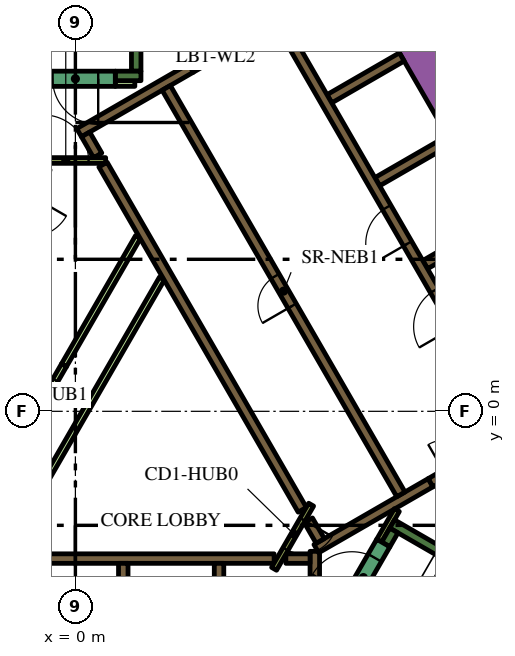
"""IFC4 building model, lengths in metres.
Left out: names, types, materials, properties, quantities, classifications, styles, units other than length and angle.
Written with IfcOpenShell. Run it as: python <this file> out.ifc"""

import sys

from ifc_helpers import new_model, si_unit, direction, frame, frame_2d, origin, place, context, subcontext, project, spatial, rectangle, extrude, element, fill, save


model = new_model("IFC4")
c1 = context("Model", 3, precision=1e-05, world=origin(), true_north=direction((0.0, 1.0)))
c2 = subcontext(c1, "Body", "Model", "MODEL_VIEW")
j1 = project(units=[si_unit("LENGTHUNIT", "METRE"), si_unit("PLANEANGLEUNIT", "RADIAN")], contexts=[c1])
p1 = place(None, origin())
s1 = spatial("IfcSite", under=j1, at=p1, CompositionType="ELEMENT")
p2 = place(p1, origin())
s2 = spatial("IfcBuilding", under=s1, at=p2, CompositionType="ELEMENT")
p3 = place(p2, frame((0.0, 0.0, 70.5)))
s3 = spatial("IfcBuildingStorey", under=s2, at=p3, CompositionType="ELEMENT", Elevation=70.5)
p4 = place(p3, frame((6.461, 13.909, 0.0), z_axis=(0.0, 0.0, 1.0), x_axis=(0.500005804227, -0.866022052686, 0.0)))
e1 = element("IfcWall", 1, at=p4, inside=s3, PredefinedType="SOLIDWALL", context=c2, shape_type="SweptSolid", body=[
    extrude(rectangle(XDim=20.834, YDim=0.9, at=frame_2d((10.417, 0.0))), origin(), (0.0, 0.0, 1.0), 3.9),
])
p5 = place(p3, frame((8.334, -2.964, 0.0), z_axis=(0.0, 0.0, 1.0), x_axis=(0.866016039709, -0.500016218704, 0.0)))
e2 = element("IfcWall", 2, at=p5, inside=s3, PredefinedType="SOLIDWALL", context=c2, shape_type="SweptSolid", body=[
    extrude(rectangle(XDim=7.05, YDim=0.25, at=frame_2d((3.525, 0.0))), origin(), (0.0, 0.0, 1.0), 3.9),
])
p6 = place(p3, frame((8.168, -3.503, 0.0), z_axis=(0.0, 0.0, 1.0), x_axis=(0.49972245349, 0.866185586049, 0.0)))
e3 = element("IfcWall", 3, at=p6, inside=s3, PredefinedType="SOLIDWALL", context=c2, shape_type="SweptSolid", body=[
    extrude(rectangle(XDim=0.425, YDim=0.25, at=frame_2d((0.212, 0.0))), origin(), (0.0, 0.0, 1.0), 3.9),
])
p7 = place(p3, frame((1.6, 8.95, 0.0), z_axis=(0.0, 0.0, 1.0), x_axis=(0.0, 1.0, 0.0)))
e4 = element("IfcWall", 4, at=p7, inside=s3, PredefinedType="SOLIDWALL", context=c2, shape_type="SweptSolid", body=[
    extrude(rectangle(XDim=6.8, YDim=0.25, at=frame_2d((3.4, 0.0))), origin(), (0.0, 0.0, 1.0), 3.9),
])
p8 = place(p3, frame((1.05, 8.825, 0.0), z_axis=(0.0, 0.0, 1.0), x_axis=(1.0, 0.0, 0.0)))
e5 = element("IfcWall", 5, at=p8, inside=s3, PredefinedType="SOLIDWALL", context=c2, shape_type="SweptSolid", body=[
    extrude(rectangle(XDim=0.675, YDim=0.25, at=frame_2d((0.337, 0.0))), origin(), (0.0, 0.0, 1.0), 3.9),
])
p9 = place(p3, frame((-5.259, -3.875, 0.0), z_axis=(0.0, 0.0, 1.0), x_axis=(1.0, 0.0, 0.0)))
e6 = element("IfcWall", 6, at=p9, inside=s3, PredefinedType="SOLIDWALL", context=c2, shape_type="SweptSolid", body=[
    extrude(rectangle(XDim=10.489, YDim=0.25, at=frame_2d((5.244, 0.0))), origin(), (0.0, 0.0, 1.0), 3.9),
])
for number, where, z_axis, x_axis in (
    (7, (3.78, -4.0, 0.0), (0.0, 0.0, 1.0), (0.0, -1.0, 0.0)),
    (8, (1.26, -4.0, 0.0), (0.0, 0.0, 1.0), (0.0, -1.0, 0.0)),
):
    element("IfcWall", number, at=place(p3, frame(where, z_axis=z_axis, x_axis=x_axis)), inside=s3, PredefinedType="SOLIDWALL", context=c2, shape_type="SweptSolid", body=[
        extrude(rectangle(XDim=2.2, YDim=0.25, at=frame_2d((1.1, 0.0))), origin(), (0.0, 0.0, 1.0), 3.9),
    ])
p10 = place(p3, frame((6.3, -7.27, 0.0), z_axis=(0.0, 0.0, 1.0), x_axis=(0.0, 1.0, 0.0)))
e9 = element("IfcWall", 9, at=p10, inside=s3, PredefinedType="SOLIDWALL", context=c2, shape_type="SweptSolid", body=[
    extrude(rectangle(XDim=3.586, YDim=0.25, at=frame_2d((1.793, 0.0))), origin(), (0.0, 0.0, 1.0), 3.9),
])
p11 = place(p3, frame((5.538, -3.875, 0.0), z_axis=(0.0, 0.0, 1.0), x_axis=(1.0, 0.0, 0.0)))
e10 = element("IfcWall", 10, at=p11, inside=s3, PredefinedType="SOLIDWALL", context=c2, shape_type="SweptSolid", body=[
    extrude(rectangle(XDim=0.637, YDim=0.25, at=frame_2d((0.318, 0.0))), origin(), (0.0, 0.0, 1.0), 3.9),
])
p12 = place(p3, frame((9.346, -1.879, 0.0), z_axis=(0.0, 0.0, 1.0), x_axis=(-0.866048528039, -0.499959945477, 0.0)))
e11 = element("IfcWall", 11, at=p12, inside=s3, PredefinedType="SOLIDWALL", context=c2, shape_type="SweptSolid", body=[
    extrude(rectangle(XDim=3.47, YDim=0.25, at=frame_2d((1.735, 0.0))), origin(), (0.0, 0.0, 1.0), 3.9),
])
p13 = place(p3, frame((6.13, -2.867, 0.0), z_axis=(0.0, 0.0, 1.0), x_axis=(0.500160776593, -0.865932559475, 0.0)))
e12 = element("IfcWall", 12, at=p13, inside=s3, PredefinedType="SOLIDWALL", context=c2, shape_type="SweptSolid", body=[
    extrude(rectangle(XDim=0.627, YDim=0.25, at=frame_2d((0.313, 0.0))), origin(), (0.0, 0.0, 1.0), 3.9),
])
for number, where, z_axis, x_axis in (
    (13, (9.204, 3.859, 0.0), (0.0, 0.0, 1.0), (0.866, 0.5, 0.0)),
    (14, (7.944, 6.041, 0.0), (0.0, 0.0, 1.0), (0.866, 0.5, 0.0)),
    (15, (6.684, 8.224, 0.0), (0.0, 0.0, 1.0), (0.866, 0.5, 0.0)),
):
    element("IfcWall", number, at=place(p3, frame(where, z_axis=z_axis, x_axis=x_axis)), inside=s3, PredefinedType="SOLIDWALL", context=c2, shape_type="SweptSolid", body=[
        extrude(rectangle(XDim=2.2, YDim=0.25, at=frame_2d((1.1, 0.0))), origin(), (0.0, 0.0, 1.0), 3.9),
    ])
p14 = place(p3, frame((0.098, 7.331, 0.0), z_axis=(0.0, 0.0, 1.0), x_axis=(0.865988154826, 0.50006451154, 0.0)))
e16 = element("IfcWall", 16, at=p14, inside=s3, PredefinedType="SOLIDWALL", context=c2, shape_type="SweptSolid", body=[
    extrude(rectangle(XDim=3.398, YDim=0.25, at=frame_2d((1.699, 0.0))), origin(), (0.0, 0.0, 1.0), 3.9),
])
p15 = place(p3, frame((0.268, 7.285, 0.0), z_axis=(0.0, 0.0, 1.0), x_axis=(0.500098681536, -0.865968422476, 0.0)))
e17 = element("IfcWall", 17, at=p15, inside=s3, PredefinedType="SOLIDWALL", context=c2, shape_type="SweptSolid", body=[
    extrude(rectangle(XDim=0.636, YDim=0.25, at=frame_2d((0.318, 0.0))), origin(), (0.0, 0.0, 1.0), 3.9),
])
p16 = place(p3, frame((5.97, -2.591, 0.0), z_axis=(0.0, 0.0, 1.0), x_axis=(-0.499994469932, 0.866028596547, 0.0)))
e18 = element("IfcWall", 18, at=p16, inside=s3, PredefinedType="SOLIDWALL", context=c2, shape_type="SweptSolid", body=[
    extrude(rectangle(XDim=10.488, YDim=0.25, at=frame_2d((5.244, 0.0))), origin(), (0.0, 0.0, 1.0), 3.9),
])
p17 = place(p3, frame((8.459, -2.599, 0.0), z_axis=(0.0, 0.0, 1.0), x_axis=(-0.500041054325, -0.866001699761, 0.0)))
e19 = element("IfcWall", 19, at=p17, inside=s3, PredefinedType="PARTITIONING", context=c2, shape_type="SweptSolid", body=[
    extrude(rectangle(XDim=0.929, YDim=0.15, at=frame_2d((0.464, 0.0))), origin(), (0.0, 0.0, 1.0), 3.9),
])
p18 = place(p3, frame((-1.887, -3.718, 0.0), z_axis=(0.0, 0.0, 1.0), x_axis=(0.500005008002, 0.866022512394, 0.0)))
e20 = element("IfcWall", 20, at=p18, inside=s3, PredefinedType="PARTITIONING", context=c2, shape_type="SweptSolid", body=[
    extrude(rectangle(XDim=8.327, YDim=0.15, at=frame_2d((4.164, 0.0))), origin(), (0.0, 0.0, 1.0), 2.75),
])
p19 = place(p3, frame((-0.3, 1.212, 0.0), z_axis=(0.0, 0.0, 1.0), x_axis=(0.499963101113, 0.866046706318, 0.0)))
e21 = element("IfcWall", 21, at=p19, inside=s3, PredefinedType="PARTITIONING", context=c2, shape_type="SweptSolid", body=[
    extrude(rectangle(XDim=3.893, YDim=0.15, at=frame_2d((1.947, 0.0))), origin(), (0.0, 0.0, 1.0), 2.75),
])
p20 = place(p3, frame((1.05, 8.625, 0.0), z_axis=(0.0, 0.0, 1.0), x_axis=(1.0, 0.0, 0.0)))
e22 = element("IfcWall", 22, at=p20, inside=s3, PredefinedType="PARTITIONING", context=c2, shape_type="SweptSolid", body=[
    extrude(rectangle(XDim=0.514, YDim=0.15, at=frame_2d((0.257, 0.0))), origin(), (0.0, 0.0, 1.0), 2.75),
])
p21 = place(p3, frame((11.553, -0.46, 0.0), z_axis=(0.0, 0.0, 1.0), x_axis=(-0.500006514828, 0.866021642414, 0.0)))
e23 = element("IfcWall", 23, at=p21, inside=s3, PredefinedType="SOLIDWALL", context=c2, shape_type="SweptSolid", body=[
    extrude(rectangle(XDim=12.35, YDim=0.25, at=frame_2d((6.175, 0.0))), origin(), (0.0, 0.0, 1.0), 3.9),
])
p22 = place(p21, frame((0.585, 0.0, 0.0)))
e24 = element("IfcOpeningElement", 24, at=p22, cuts=e23, PredefinedType="OPENING", context=c2, shape_type="SweptSolid", body=[
    extrude(rectangle(XDim=1.1, YDim=2.1, at=frame_2d((0.55, 1.05))), frame((0.0, 0.135, 0.0), z_axis=(0.0, -1.0, 0.0), x_axis=(1.0, 0.0, 0.0)), (0.0, 0.0, 1.0), 0.27),
])
p23 = place(p21, frame((3.105, 0.0, 0.0)))
e25 = element("IfcOpeningElement", 25, at=p23, cuts=e23, PredefinedType="OPENING", context=c2, shape_type="SweptSolid", body=[
    extrude(rectangle(XDim=1.1, YDim=2.1, at=frame_2d((0.55, 1.05))), frame((0.0, 0.135, 0.0), z_axis=(0.0, -1.0, 0.0), x_axis=(1.0, 0.0, 0.0)), (0.0, 0.0, 1.0), 0.27),
])
p24 = place(p21, frame((5.625, 0.0, 0.0)))
e26 = element("IfcOpeningElement", 26, at=p24, cuts=e23, PredefinedType="OPENING", context=c2, shape_type="SweptSolid", body=[
    extrude(rectangle(XDim=1.1, YDim=2.1, at=frame_2d((0.55, 1.05))), frame((0.0, 0.135, 0.0), z_axis=(0.0, -1.0, 0.0), x_axis=(1.0, 0.0, 0.0)), (0.0, 0.0, 1.0), 0.27),
])
p25 = place(p3, frame((8.565, -2.185, 0.0), z_axis=(0.0, 0.0, 1.0), x_axis=(-0.499997954832, 0.866026584559, 0.0)))
e27 = element("IfcWall", 27, at=p25, inside=s3, PredefinedType="SOLIDWALL", context=c2, shape_type="SweptSolid", body=[
    extrude(rectangle(XDim=12.35, YDim=0.25, at=frame_2d((6.175, 0.0))), origin(), (0.0, 0.0, 1.0), 3.9),
])
p26 = place(p25, frame((5.725, 0.0, 0.0)))
e28 = element("IfcOpeningElement", 28, at=p26, cuts=e27, PredefinedType="OPENING", context=c2, shape_type="SweptSolid", body=[
    extrude(rectangle(XDim=0.9, YDim=2.1, at=frame_2d((0.45, 1.05))), frame((0.0, 0.135, 0.0), z_axis=(0.0, -1.0, 0.0), x_axis=(1.0, 0.0, 0.0)), (0.0, 0.0, 1.0), 0.27),
])
p27 = place(p3, frame((7.053, -5.284, 0.0), z_axis=(0.0, 0.0, 1.0), x_axis=(0.500078061341, 0.865980330357, 0.0)))
e29 = element("IfcWall", 29, at=p27, inside=s3, PredefinedType="SOLIDWALL", context=c2, shape_type="SweptSolid", body=[
    extrude(rectangle(XDim=2.1, YDim=0.4, at=frame_2d((1.05, 0.0))), origin(), (0.0, 0.0, 1.0), 3.9),
])
p28 = place(p27, frame((0.45, 0.0, 0.0)))
e30 = element("IfcOpeningElement", 30, at=p28, cuts=e29, PredefinedType="OPENING", context=c2, shape_type="SweptSolid", body=[
    extrude(rectangle(XDim=1.2, YDim=2.1, at=frame_2d((0.6, 1.05))), frame((0.0, 0.21, 0.0), z_axis=(0.0, -1.0, 0.0), x_axis=(1.0, 0.0, 0.0)), (0.0, 0.0, 1.0), 0.42),
])
p29 = place(p3, frame((9.346, -1.879, 0.0), z_axis=(0.0, 0.0, 1.0), x_axis=(0.866047807691, 0.499961193289, 0.0)))
e31 = element("IfcWall", 31, at=p29, inside=s3, PredefinedType="SOLIDWALL", context=c2, shape_type="SweptSolid", body=[
    extrude(rectangle(XDim=1.8, YDim=0.25, at=frame_2d((0.9, 0.0))), origin(), (0.0, 0.0, 1.0), 3.9),
])
p30 = place(p29, frame((0.45, 0.0, 0.0)))
e32 = element("IfcOpeningElement", 32, at=p30, cuts=e31, PredefinedType="OPENING", context=c2, shape_type="SweptSolid", body=[
    extrude(rectangle(XDim=0.9, YDim=2.1, at=frame_2d((0.45, 1.05))), frame((0.0, 0.135, 0.0), z_axis=(0.0, -1.0, 0.0), x_axis=(1.0, 0.0, 0.0)), (0.0, 0.0, 1.0), 0.27),
])
p31 = place(p3, frame((1.05, 8.75, 0.0), z_axis=(0.0, 0.0, 1.0), x_axis=(-1.0, 0.0, 0.0)))
e33 = element("IfcWall", 33, at=p31, inside=s3, PredefinedType="SOLIDWALL", context=c2, shape_type="SweptSolid", body=[
    extrude(rectangle(XDim=2.1, YDim=0.4, at=frame_2d((1.05, 0.0))), origin(), (0.0, 0.0, 1.0), 3.9),
])
p32 = place(p31, frame((0.45, 0.0, 0.0)))
e34 = element("IfcOpeningElement", 34, at=p32, cuts=e33, PredefinedType="OPENING", context=c2, shape_type="SweptSolid", body=[
    extrude(rectangle(XDim=1.2, YDim=2.1, at=frame_2d((0.6, 1.05))), frame((0.0, 0.21, 0.0), z_axis=(0.0, -1.0, 0.0), x_axis=(1.0, 0.0, 0.0)), (0.0, 0.0, 1.0), 0.42),
])
p33 = place(p3, frame((6.203, -2.456, 0.0), z_axis=(0.0, 0.0, 1.0), x_axis=(-0.500043961785, -0.866000020948, 0.0)))
e35 = element("IfcWall", 35, at=p33, inside=s3, PredefinedType="PARTITIONING", context=c2, shape_type="SweptSolid", body=[
    extrude(rectangle(XDim=1.95, YDim=0.15, at=frame_2d((0.975, 0.0))), origin(), (0.0, 0.0, 1.0), 3.9),
])
p34 = place(p33, frame((0.45, 0.0, 0.0)))
e36 = element("IfcOpeningElement", 36, at=p34, cuts=e35, PredefinedType="OPENING", context=c2, shape_type="SweptSolid", body=[
    extrude(rectangle(XDim=0.9, YDim=2.1, at=frame_2d((0.45, 1.05))), frame((0.0, 0.085, 0.0), z_axis=(0.0, -1.0, 0.0), x_axis=(1.0, 0.0, 0.0)), (0.0, 0.0, 1.0), 0.17),
])
p35 = place(p3, frame((-1.303, 6.6, 0.0), z_axis=(0.0, 0.0, 1.0), x_axis=(1.0, 0.0, 0.0)))
e37 = element("IfcWall", 37, at=p35, inside=s3, PredefinedType="PARTITIONING", context=c2, shape_type="SweptSolid", body=[
    extrude(rectangle(XDim=2.1, YDim=0.15, at=frame_2d((1.05, 0.0))), origin(), (0.0, 0.0, 1.0), 3.9),
])
p36 = place(p35, frame((0.45, 0.0, 0.0)))
e38 = element("IfcOpeningElement", 38, at=p36, cuts=e37, PredefinedType="OPENING", context=c2, shape_type="SweptSolid", body=[
    extrude(rectangle(XDim=1.2, YDim=2.1, at=frame_2d((0.6, 1.05))), frame((0.0, 0.085, 0.0), z_axis=(0.0, -1.0, 0.0), x_axis=(1.0, 0.0, 0.0)), (0.0, 0.0, 1.0), 0.17),
])
p37 = place(p3, frame((3.081, 8.961, 0.0), z_axis=(0.0, 0.0, 1.0), x_axis=(0.866034573852, 0.49998411664, 0.0)))
e39 = element("IfcWall", 39, at=p37, inside=s3, PredefinedType="PARTITIONING", context=c2, shape_type="SweptSolid", body=[
    extrude(rectangle(XDim=1.4, YDim=0.09, at=frame_2d((0.7, 0.0))), origin(), (0.0, 0.0, 1.0), 2.75),
])
p38 = place(p37, frame((0.1, 0.0, 0.0)))
e40 = element("IfcOpeningElement", 40, at=p38, cuts=e39, PredefinedType="OPENING", context=c2, shape_type="SweptSolid", body=[
    extrude(rectangle(XDim=1.2, YDim=2.1, at=frame_2d((0.6, 1.05))), frame((0.0, 0.055, 0.0), z_axis=(0.0, -1.0, 0.0), x_axis=(1.0, 0.0, 0.0)), (0.0, 0.0, 1.0), 0.11),
])
p39 = place(p3, frame((-1.2, -0.346, 0.0), z_axis=(0.0, 0.0, 1.0), x_axis=(0.499961193289, 0.866047807691, 0.0)))
e41 = element("IfcWall", 41, at=p39, inside=s3, PredefinedType="PARTITIONING", context=c2, shape_type="SweptSolid", body=[
    extrude(rectangle(XDim=1.8, YDim=0.15, at=frame_2d((0.9, 0.0))), origin(), (0.0, 0.0, 1.0), 2.75),
])
p40 = place(p39, frame((0.45, 0.0, 0.0)))
e42 = element("IfcOpeningElement", 42, at=p40, cuts=e41, PredefinedType="OPENING", context=c2, shape_type="SweptSolid", body=[
    extrude(rectangle(XDim=0.9, YDim=2.1, at=frame_2d((0.45, 1.05))), frame((0.0, 0.085, 0.0), z_axis=(0.0, -1.0, 0.0), x_axis=(1.0, 0.0, 0.0)), (0.0, 0.0, 1.0), 0.17),
])
p41 = place(p3, frame((6.163, 18.475, 0.0), z_axis=(0.0, 0.0, 1.0), x_axis=(0.500001317485, -0.866024643133, 0.0)))
e43 = element("IfcWall", 43, at=p41, inside=s3, PredefinedType="PARTITIONING", context=c2, shape_type="SweptSolid", body=[
    extrude(rectangle(XDim=25.767, YDim=0.15, at=frame_2d((12.883, 0.0))), origin(), (0.0, 0.0, 1.0), 2.75),
])
p42 = place(p41, frame((21.138, 0.0, 0.0)))
e44 = element("IfcOpeningElement", 44, at=p42, cuts=e43, PredefinedType="OPENING", context=c2, shape_type="SweptSolid", body=[
    extrude(rectangle(XDim=1.0, YDim=2.1, at=frame_2d((0.5, 1.05))), frame((0.0, 0.085, 0.0), z_axis=(0.0, -1.0, 0.0), x_axis=(1.0, 0.0, 0.0)), (0.0, 0.0, 1.0), 0.17),
])
p43 = place(p41, frame((9.948, 0.0, 0.0)))
e45 = element("IfcOpeningElement", 45, at=p43, cuts=e43, PredefinedType="OPENING", context=c2, shape_type="SweptSolid", body=[
    extrude(rectangle(XDim=1.1, YDim=2.1, at=frame_2d((0.55, 1.05))), frame((0.0, 0.085, 0.0), z_axis=(0.0, -1.0, 0.0), x_axis=(1.0, 0.0, 0.0)), (0.0, 0.0, 1.0), 0.17),
])
p44 = place(p41, frame((8.641, 0.0, 0.0)))
e46 = element("IfcOpeningElement", 46, at=p44, cuts=e43, PredefinedType="OPENING", context=c2, shape_type="SweptSolid", body=[
    extrude(rectangle(XDim=1.0, YDim=2.1, at=frame_2d((0.5, 1.05))), frame((0.0, 0.085, 0.0), z_axis=(0.0, -1.0, 0.0), x_axis=(1.0, 0.0, 0.0)), (0.0, 0.0, 1.0), 0.17),
])
p45 = place(p41, frame((0.18, 0.0, 0.0)))
e47 = element("IfcOpeningElement", 47, at=p45, cuts=e43, PredefinedType="OPENING", context=c2, shape_type="SweptSolid", body=[
    extrude(rectangle(XDim=1.0, YDim=2.1, at=frame_2d((0.5, 1.05))), frame((0.0, 0.085, 0.0), z_axis=(0.0, -1.0, 0.0), x_axis=(1.0, 0.0, 0.0)), (0.0, 0.0, 1.0), 0.17),
])
p46 = place(p23, origin())
e48 = element("IfcDoor", 48, at=p46, inside=s3, OperationType="DOUBLE_DOOR_SLIDING", PredefinedType="DOOR", context=c2, shape_type="SweptSolid", body=[
    extrude(rectangle(XDim=1.1, YDim=2.1, at=frame_2d((0.55, 1.05))), frame((0.0, 0.025, 0.0), z_axis=(0.0, -1.0, 0.0), x_axis=(1.0, 0.0, 0.0)), (0.0, 0.0, 1.0), 0.05),
])
fill(e25, e48)
p47 = place(p24, origin())
e49 = element("IfcDoor", 49, at=p47, inside=s3, OperationType="DOUBLE_DOOR_SLIDING", PredefinedType="DOOR", context=c2, shape_type="SweptSolid", body=[
    extrude(rectangle(XDim=1.1, YDim=2.1, at=frame_2d((0.55, 1.05))), frame((0.0, 0.025, 0.0), z_axis=(0.0, -1.0, 0.0), x_axis=(1.0, 0.0, 0.0)), (0.0, 0.0, 1.0), 0.05),
])
fill(e26, e49)
p48 = place(p26, origin())
e50 = element("IfcDoor", 50, at=p48, inside=s3, OperationType="SINGLE_SWING_LEFT", PredefinedType="DOOR", context=c2, shape_type="SweptSolid", body=[
    extrude(rectangle(XDim=0.9, YDim=2.1, at=frame_2d((0.45, 1.05))), frame((0.0, 0.025, 0.0), z_axis=(0.0, -1.0, 0.0), x_axis=(1.0, 0.0, 0.0)), (0.0, 0.0, 1.0), 0.05),
])
fill(e28, e50)
p49 = place(p28, origin())
e51 = element("IfcDoor", 51, at=p49, inside=s3, OperationType="SINGLE_SWING_LEFT", PredefinedType="DOOR", context=c2, shape_type="SweptSolid", body=[
    extrude(rectangle(XDim=1.2, YDim=2.1, at=frame_2d((0.6, 1.05))), frame((0.0, 0.025, 0.0), z_axis=(0.0, -1.0, 0.0), x_axis=(1.0, 0.0, 0.0)), (0.0, 0.0, 1.0), 0.05),
])
fill(e30, e51)
p50 = place(p32, origin())
e52 = element("IfcDoor", 52, at=p50, inside=s3, OperationType="SINGLE_SWING_LEFT", PredefinedType="DOOR", context=c2, shape_type="SweptSolid", body=[
    extrude(rectangle(XDim=1.2, YDim=2.1, at=frame_2d((0.6, 1.05))), frame((0.0, 0.025, 0.0), z_axis=(0.0, -1.0, 0.0), x_axis=(1.0, 0.0, 0.0)), (0.0, 0.0, 1.0), 0.05),
])
fill(e34, e52)
p51 = place(p34, origin())
e53 = element("IfcDoor", 53, at=p51, inside=s3, OperationType="SINGLE_SWING_LEFT", PredefinedType="DOOR", context=c2, shape_type="SweptSolid", body=[
    extrude(rectangle(XDim=0.9, YDim=2.1, at=frame_2d((0.45, 1.05))), frame((0.0, 0.025, 0.0), z_axis=(0.0, -1.0, 0.0), x_axis=(1.0, 0.0, 0.0)), (0.0, 0.0, 1.0), 0.05),
])
fill(e36, e53)
p52 = place(p36, origin())
e54 = element("IfcDoor", 54, at=p52, inside=s3, OperationType="SINGLE_SWING_LEFT", PredefinedType="DOOR", context=c2, shape_type="SweptSolid", body=[
    extrude(rectangle(XDim=1.2, YDim=2.1, at=frame_2d((0.6, 1.05))), frame((0.0, 0.025, 0.0), z_axis=(0.0, -1.0, 0.0), x_axis=(1.0, 0.0, 0.0)), (0.0, 0.0, 1.0), 0.05),
])
fill(e38, e54)
p53 = place(p38, origin())
e55 = element("IfcDoor", 55, at=p53, inside=s3, OperationType="SINGLE_SWING_LEFT", PredefinedType="DOOR", context=c2, shape_type="SweptSolid", body=[
    extrude(rectangle(XDim=1.2, YDim=2.1, at=frame_2d((0.6, 1.05))), frame((0.0, 0.025, 0.0), z_axis=(0.0, -1.0, 0.0), x_axis=(1.0, 0.0, 0.0)), (0.0, 0.0, 1.0), 0.05),
])
fill(e40, e55)
p54 = place(p40, origin())
e56 = element("IfcDoor", 56, at=p54, inside=s3, OperationType="SINGLE_SWING_LEFT", PredefinedType="DOOR", context=c2, shape_type="SweptSolid", body=[
    extrude(rectangle(XDim=0.9, YDim=2.1, at=frame_2d((0.45, 1.05))), frame((0.0, 0.025, 0.0), z_axis=(0.0, -1.0, 0.0), x_axis=(1.0, 0.0, 0.0)), (0.0, 0.0, 1.0), 0.05),
])
fill(e42, e56)
save(model, sys.argv[1])
